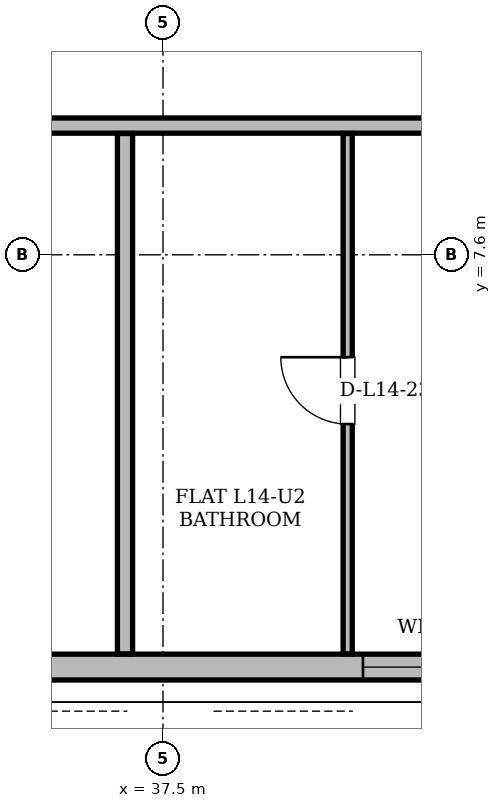
"""IFC4 building model, lengths in metres.
Left out: names, types, materials, properties, quantities, classifications, styles, units other than length and angle.
Written with IfcOpenShell. Run it as: python <this file> out.ifc"""

import sys

from ifc_helpers import new_model, si_unit, direction, frame, frame_2d, origin, place, context, subcontext, project, spatial, rectangle, extrude, element, fill, save


model = new_model("IFC4")
c1 = context("Model", 3, precision=1e-05, world=origin(), true_north=direction((0.0, 1.0)))
c2 = subcontext(c1, "Body", "Model", "MODEL_VIEW")
j1 = project(units=[si_unit("LENGTHUNIT", "METRE"), si_unit("PLANEANGLEUNIT", "RADIAN")], contexts=[c1])
p1 = place(None, origin())
s1 = spatial("IfcSite", under=j1, at=p1, CompositionType="ELEMENT")
p2 = place(p1, origin())
s2 = spatial("IfcBuilding", under=s1, at=p2, CompositionType="ELEMENT")
p3 = place(p2, frame((0.0, 0.0, 56.1)))
s3 = spatial("IfcBuildingStorey", under=s2, at=p3, CompositionType="ELEMENT", Elevation=56.1)
p4 = place(p3, frame((20.753, 2.176, 0.0), z_axis=(0.0, 0.0, 1.0), x_axis=(1.0, 0.0, 0.0)))
e1 = element("IfcWall", 1, at=p4, inside=s3, PredefinedType="SOLIDWALL", context=c2, shape_type="SweptSolid", body=[
    extrude(rectangle(XDim=33.494, YDim=0.34, at=frame_2d((16.747, 0.0))), origin(), (0.0, 0.0, 1.0), 2.494),
])
p5 = place(p4, frame((6.159, 0.0, 0.0)))
e2 = element("IfcOpeningElement", 2, at=p5, cuts=e1, PredefinedType="OPENING", context=c2, shape_type="SweptSolid", body=[
    extrude(rectangle(XDim=1.5, YDim=2.2, at=frame_2d((0.75, 1.1))), frame((0.0, 0.17, 0.0), z_axis=(0.0, -1.0, 0.0), x_axis=(1.0, 0.0, 0.0)), (0.0, 0.0, 1.0), 0.34),
])
p6 = place(p4, frame((24.169, 0.0, 0.0)))
e3 = element("IfcOpeningElement", 3, at=p6, cuts=e1, PredefinedType="OPENING", context=c2, shape_type="SweptSolid", body=[
    extrude(rectangle(XDim=1.5, YDim=2.2, at=frame_2d((0.75, 1.1))), frame((0.0, 0.17, 0.0), z_axis=(0.0, -1.0, 0.0), x_axis=(1.0, 0.0, 0.0)), (0.0, 0.0, 1.0), 0.34),
])
p7 = place(p4, frame((1.994, 0.0, 0.85)))
e4 = element("IfcOpeningElement", 4, at=p7, cuts=e1, PredefinedType="OPENING", context=c2, shape_type="SweptSolid", body=[
    extrude(rectangle(XDim=2.2, YDim=1.534, at=frame_2d((1.1, 0.767))), frame((0.0, 0.17, 0.0), z_axis=(0.0, -1.0, 0.0), x_axis=(1.0, 0.0, 0.0)), (0.0, 0.0, 1.0), 0.34),
])
p8 = place(p4, frame((12.612, 0.0, 0.85)))
e5 = element("IfcOpeningElement", 5, at=p8, cuts=e1, PredefinedType="OPENING", context=c2, shape_type="SweptSolid", body=[
    extrude(rectangle(XDim=1.6, YDim=1.534, at=frame_2d((0.8, 0.767))), frame((0.0, 0.17, 0.0), z_axis=(0.0, -1.0, 0.0), x_axis=(1.0, 0.0, 0.0)), (0.0, 0.0, 1.0), 0.34),
])
p9 = place(p4, frame((19.378, 0.0, 0.85)))
e6 = element("IfcOpeningElement", 6, at=p9, cuts=e1, PredefinedType="OPENING", context=c2, shape_type="SweptSolid", body=[
    extrude(rectangle(XDim=1.8, YDim=1.534, at=frame_2d((0.9, 0.767))), frame((0.0, 0.17, 0.0), z_axis=(0.0, -1.0, 0.0), x_axis=(1.0, 0.0, 0.0)), (0.0, 0.0, 1.0), 0.34),
])
p10 = place(p4, frame((30.119, 0.0, 0.85)))
e7 = element("IfcOpeningElement", 7, at=p10, cuts=e1, PredefinedType="OPENING", context=c2, shape_type="SweptSolid", body=[
    extrude(rectangle(XDim=2.2, YDim=1.534, at=frame_2d((1.1, 0.767))), frame((0.0, 0.17, 0.0), z_axis=(0.0, -1.0, 0.0), x_axis=(1.0, 0.0, 0.0)), (0.0, 0.0, 1.0), 0.34),
])
p11 = place(p3, frame((19.2, 9.3, 0.0), z_axis=(0.0, 0.0, 1.0), x_axis=(1.0, 0.0, 0.0)))
e8 = element("IfcWall", 8, at=p11, inside=s3, PredefinedType="PARTITIONING", context=c2, shape_type="SweptSolid", body=[
    extrude(rectangle(XDim=36.6, YDim=0.2, at=frame_2d((18.3, 0.0))), origin(), (0.0, 0.0, 1.0), 2.738),
])
p12 = place(p11, frame((10.855, 0.0, 0.0)))
e9 = element("IfcOpeningElement", 9, at=p12, cuts=e8, PredefinedType="OPENING", context=c2, shape_type="SweptSolid", body=[
    extrude(rectangle(XDim=1.0, YDim=2.18, at=frame_2d((0.5, 1.09))), frame((0.0, 0.1, 0.0), z_axis=(0.0, -1.0, 0.0), x_axis=(1.0, 0.0, 0.0)), (0.0, 0.0, 1.0), 0.2),
])
p13 = place(p11, frame((24.062, 0.0, 0.0)))
e10 = element("IfcOpeningElement", 10, at=p13, cuts=e8, PredefinedType="OPENING", context=c2, shape_type="SweptSolid", body=[
    extrude(rectangle(XDim=1.0, YDim=2.18, at=frame_2d((0.5, 1.09))), frame((0.0, 0.1, 0.0), z_axis=(0.0, -1.0, 0.0), x_axis=(1.0, 0.0, 0.0)), (0.0, 0.0, 1.0), 0.2),
])
p14 = place(p11, frame((31.904, 0.0, 0.0)))
e11 = element("IfcOpeningElement", 11, at=p14, cuts=e8, PredefinedType="OPENING", context=c2, shape_type="SweptSolid", body=[
    extrude(rectangle(XDim=1.0, YDim=2.18, at=frame_2d((0.5, 1.09))), frame((0.0, 0.1, 0.0), z_axis=(0.0, -1.0, 0.0), x_axis=(1.0, 0.0, 0.0)), (0.0, 0.0, 1.0), 0.2),
])
p15 = place(p3, frame((37.0, 2.35, 0.0), z_axis=(0.0, 0.0, 1.0), x_axis=(0.0, 1.0, 0.0)))
e12 = element("IfcWall", 12, at=p15, inside=s3, PredefinedType="PARTITIONING", context=c2, shape_type="SweptSolid", body=[
    extrude(rectangle(XDim=6.846, YDim=0.2, at=frame_2d((3.423, 0.0))), origin(), (0.0, 0.0, 1.0), 3.36),
])
p16 = place(p3, frame((39.93, 2.35, 0.0), z_axis=(0.0, 0.0, 1.0), x_axis=(0.0, 1.0, 0.0)))
e13 = element("IfcWall", 13, at=p16, inside=s3, PredefinedType="PARTITIONING", context=c2, shape_type="SweptSolid", body=[
    extrude(rectangle(XDim=6.846, YDim=0.12, at=frame_2d((3.423, 0.0))), origin(), (0.0, 0.0, 1.0), 3.36),
])
p17 = place(p16, frame((3.023, 0.0, 0.0)))
e14 = element("IfcOpeningElement", 14, at=p17, cuts=e13, PredefinedType="OPENING", context=c2, shape_type="SweptSolid", body=[
    extrude(rectangle(XDim=0.88, YDim=2.08, at=frame_2d((0.44, 1.04))), frame((0.0, 0.06, 0.0), z_axis=(0.0, -1.0, 0.0), x_axis=(1.0, 0.0, 0.0)), (0.0, 0.0, 1.0), 0.12),
])
p18 = place(p9, origin())
e15 = element("IfcWindow", 15, at=p18, inside=s3, PartitioningType="SINGLE_PANEL", PredefinedType="WINDOW", context=c2, shape_type="SweptSolid", body=[
    extrude(rectangle(XDim=1.8, YDim=1.534, at=frame_2d((0.9, 0.767))), frame((0.0, 0.03, 0.0), z_axis=(0.0, -1.0, 0.0), x_axis=(1.0, 0.0, 0.0)), (0.0, 0.0, 1.0), 0.06),
])
fill(e6, e15)
p19 = place(p17, origin())
e16 = element("IfcDoor", 16, at=p19, inside=s3, OperationType="SINGLE_SWING_RIGHT", PredefinedType="DOOR", context=c2, shape_type="SweptSolid", body=[
    extrude(rectangle(XDim=0.88, YDim=2.08, at=frame_2d((0.44, 1.04))), frame((0.0, 0.025, 0.0), z_axis=(0.0, -1.0, 0.0), x_axis=(1.0, 0.0, 0.0)), (0.0, 0.0, 1.0), 0.05),
])
fill(e14, e16)
save(model, sys.argv[1])
